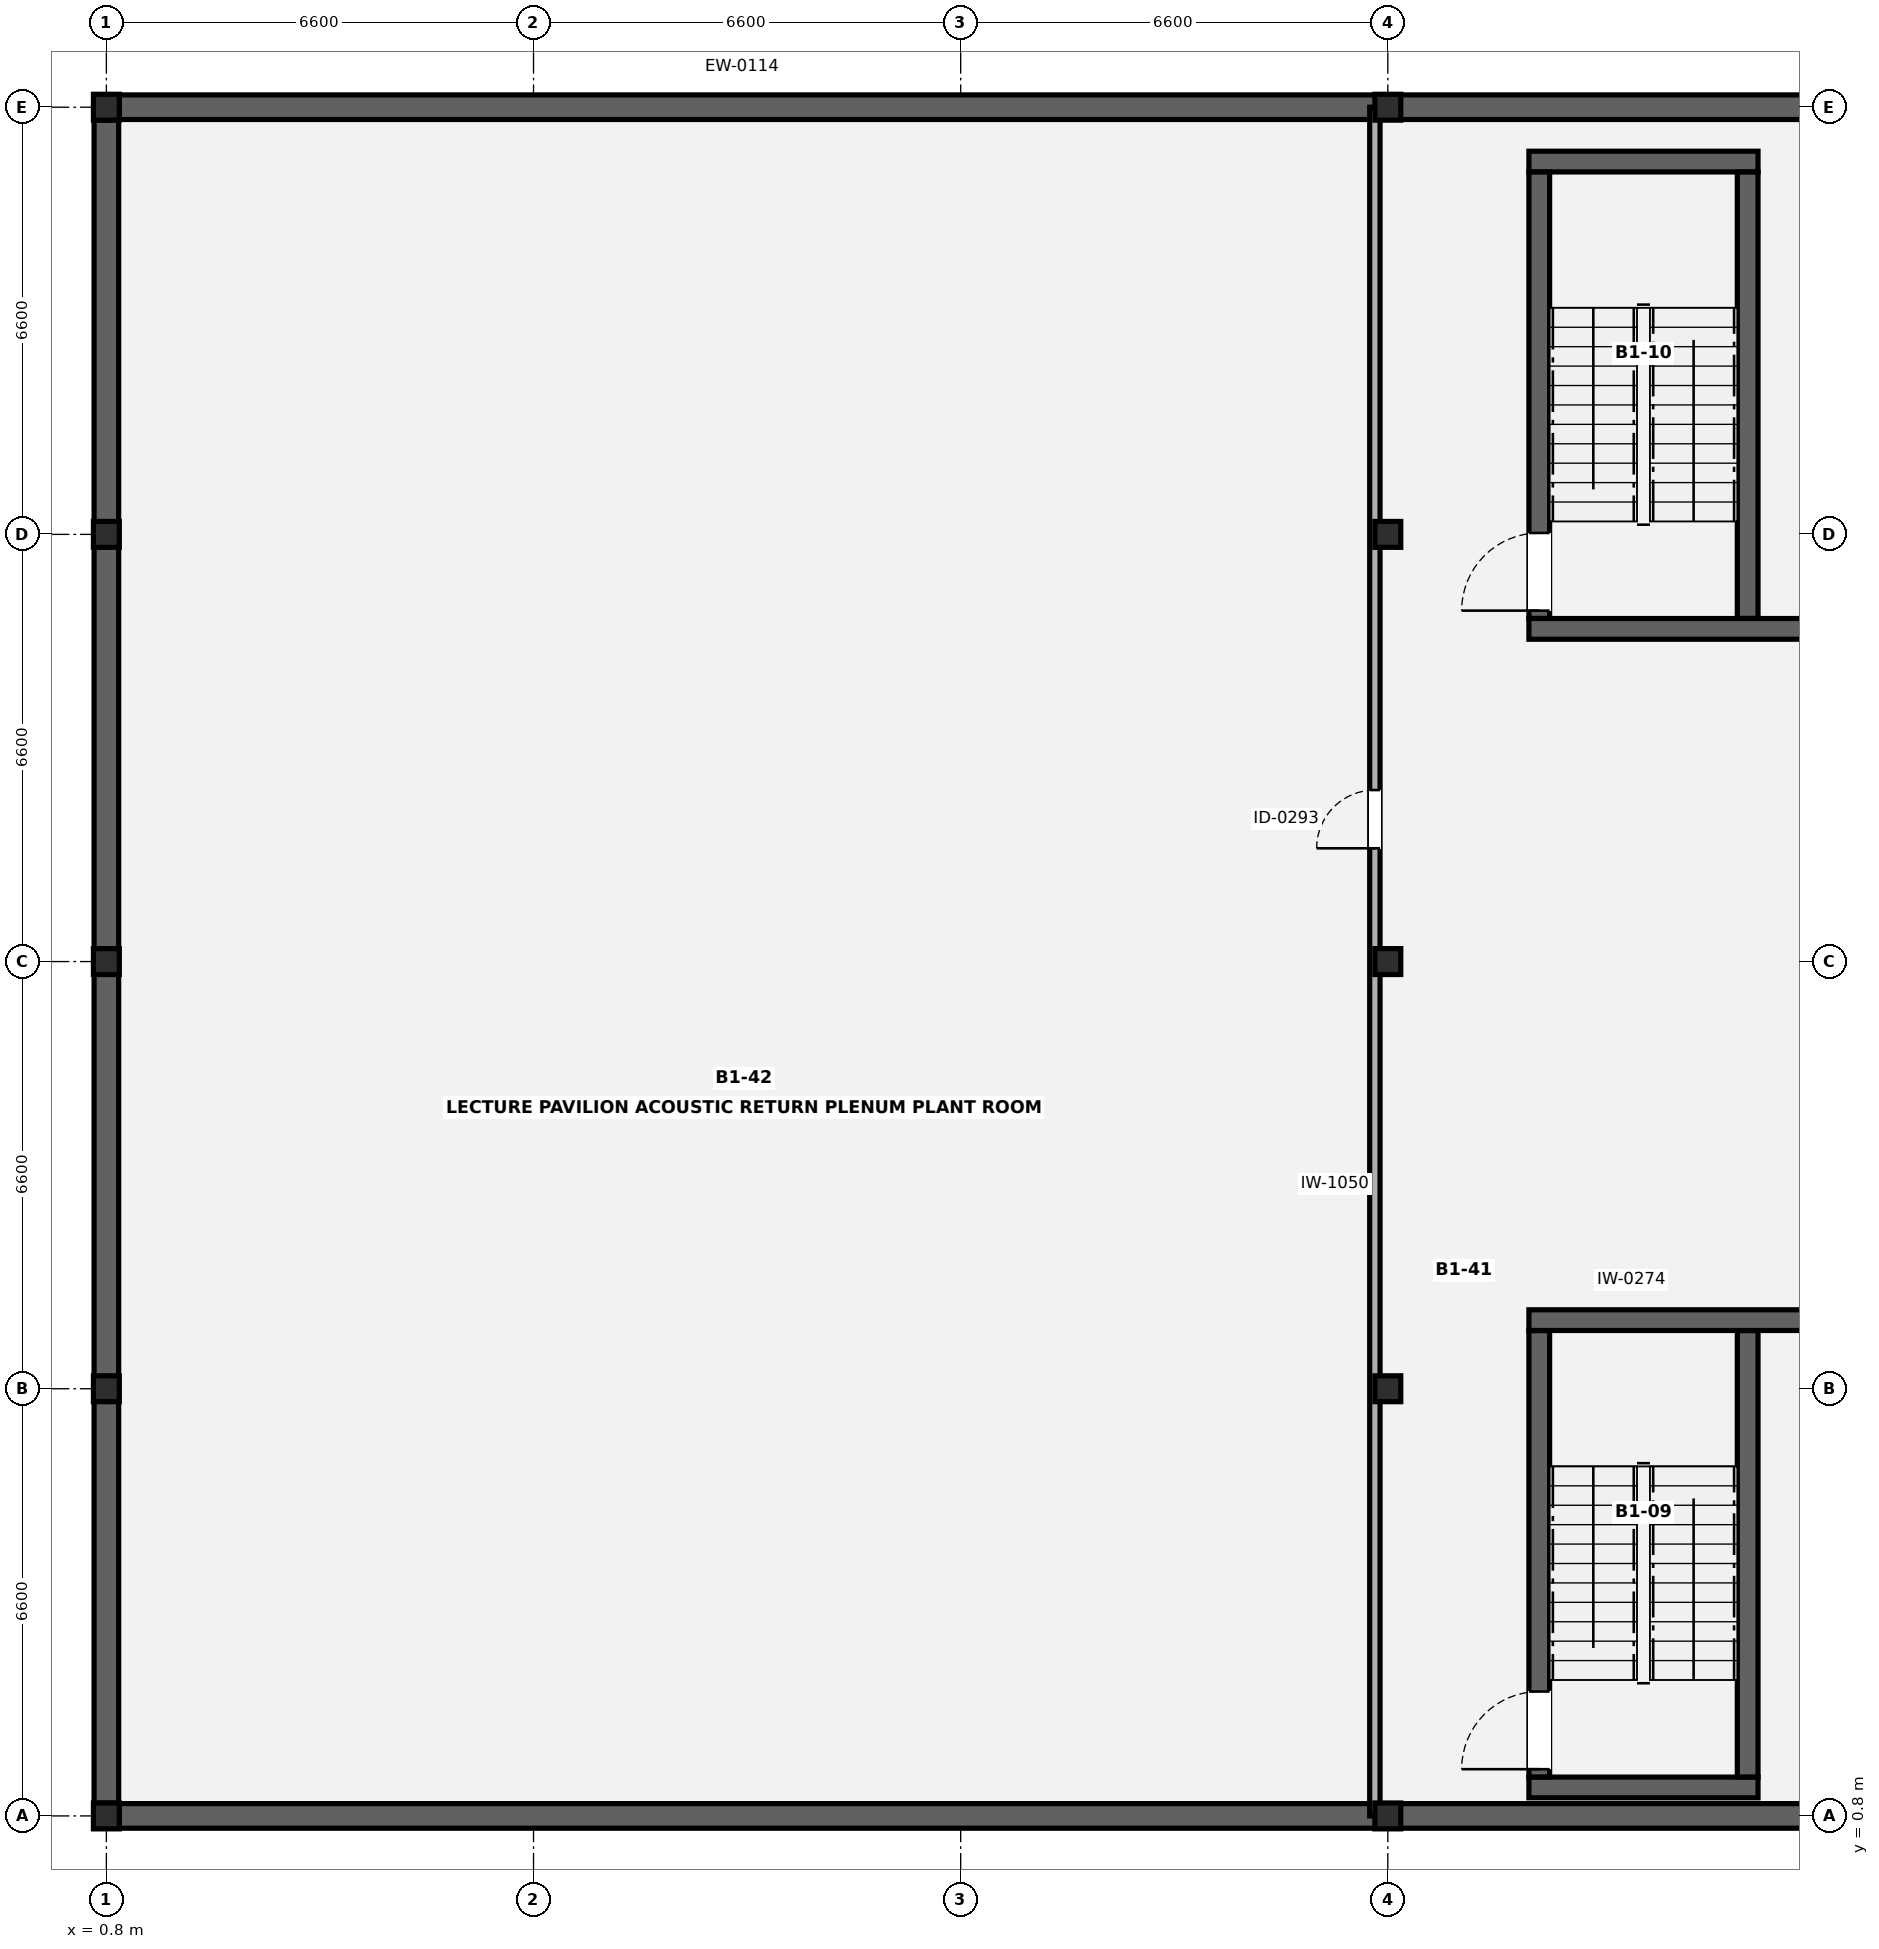
"""IFC4 building model, lengths in metres.
Left out: names, types, materials, properties, quantities, classifications, styles, units other than length and angle.
Written with IfcOpenShell. Run it as: python <this file> out.ifc"""

import sys

from ifc_helpers import new_model, si_unit, direction, frame, frame_2d, origin, origin_2d, place, context, subcontext, project, spatial, rectangle, i_section, extrude, element, fill, save


model = new_model("IFC4")
c1 = context("Model", 3, precision=1e-05, world=origin(), true_north=direction((0.0, 1.0)))
c2 = subcontext(c1, "Body", "Model", "MODEL_VIEW")
j1 = project(units=[si_unit("LENGTHUNIT", "METRE"), si_unit("PLANEANGLEUNIT", "RADIAN")], contexts=[c1])
p1 = place(None, origin())
s1 = spatial("IfcSite", under=j1, at=p1, CompositionType="ELEMENT")
p2 = place(p1, origin())
s2 = spatial("IfcBuilding", under=s1, at=p2, CompositionType="ELEMENT")
p3 = place(p2, frame((0.0, 0.0, -4.2)))
s3 = spatial("IfcBuildingStorey", under=s2, at=p3, CompositionType="ELEMENT", Elevation=-4.2)
for number, where, z_axis, x_axis in (
    (1, (0.8, 0.8, 0.0), (0.0, 0.0, 1.0), (1.0, 0.0, 0.0)),
    (2, (0.8, 7.4, 0.0), (0.0, 0.0, 1.0), (1.0, 0.0, 0.0)),
    (3, (0.8, 14.0, 0.0), (0.0, 0.0, 1.0), (1.0, 0.0, 0.0)),
    (4, (0.8, 20.6, 0.0), (0.0, 0.0, 1.0), (1.0, 0.0, 0.0)),
    (5, (0.8, 27.2, 0.0), (0.0, 0.0, 1.0), (1.0, 0.0, 0.0)),
    (6, (20.6, 0.8, 0.0), (0.0, 0.0, 1.0), (1.0, 0.0, 0.0)),
    (7, (20.6, 7.4, 0.0), (0.0, 0.0, 1.0), (1.0, 0.0, 0.0)),
    (8, (20.6, 14.0, 0.0), (0.0, 0.0, 1.0), (1.0, 0.0, 0.0)),
    (9, (20.6, 20.6, 0.0), (0.0, 0.0, 1.0), (1.0, 0.0, 0.0)),
    (10, (20.6, 27.2, 0.0), (0.0, 0.0, 1.0), (1.0, 0.0, 0.0)),
):
    element("IfcColumn", number, at=place(p3, frame(where, z_axis=z_axis, x_axis=x_axis)), inside=s3, PredefinedType="COLUMN", context=c2, shape_type="SweptSolid", body=[
        extrude(i_section(OverallWidth=0.4, OverallDepth=0.4, WebThickness=0.02, FlangeThickness=0.035, FilletRadius=0.016, at=origin_2d()), origin(), (0.0, 0.0, 1.0), 4.2),
    ])
for number, where, z_axis, x_axis in (
    (11, (0.8, 0.998, 0.0), (0.0, 0.0, 1.0), (0.0, 1.0, 0.0)),
    (12, (0.998, 27.2, 0.0), (0.0, 0.0, 1.0), (1.0, 0.0, 0.0)),
    (13, (27.002, 0.8, 0.0), (0.0, 0.0, 1.0), (-1.0, 0.0, 0.0)),
):
    element("IfcWall", number, at=place(p3, frame(where, z_axis=z_axis, x_axis=x_axis)), inside=s3, PredefinedType="USERDEFINED", context=c2, shape_type="SweptSolid", body=[
        extrude(rectangle(XDim=26.004, YDim=0.38, at=frame_2d((13.002, 0.0))), origin(), (0.0, 0.0, 1.0), 3.9),
    ])
p4 = place(p3, frame((22.78, 1.24, 0.0), z_axis=(0.0, 0.0, 1.0), x_axis=(1.0, 0.0, 0.0)))
e14 = element("IfcWall", 14, at=p4, inside=s3, PredefinedType="SHEAR", context=c2, shape_type="SweptSolid", body=[
    extrude(rectangle(XDim=3.54, YDim=0.32, at=frame_2d((1.77, 0.0))), origin(), (0.0, 0.0, 1.0), 3.94),
])
p5 = place(p3, frame((22.78, 8.46, 0.0), z_axis=(0.0, 0.0, 1.0), x_axis=(1.0, 0.0, 0.0)))
e15 = element("IfcWall", 15, at=p5, inside=s3, PredefinedType="SHEAR", context=c2, shape_type="SweptSolid", body=[
    extrude(rectangle(XDim=4.275, YDim=0.32, at=frame_2d((2.137, 0.0))), origin(), (0.0, 0.0, 1.0), 3.94),
])
p6 = place(p3, frame((22.94, 1.402, 0.0), z_axis=(0.0, 0.0, 1.0), x_axis=(0.0, 1.0, 0.0)))
e16 = element("IfcWall", 16, at=p6, inside=s3, PredefinedType="SHEAR", context=c2, shape_type="SweptSolid", body=[
    extrude(rectangle(XDim=6.896, YDim=0.32, at=frame_2d((3.448, 0.0))), origin(), (0.0, 0.0, 1.0), 3.94),
])
p7 = place(p6, frame((0.12, 0.0, 0.0)))
e17 = element("IfcOpeningElement", 17, at=p7, cuts=e16, PredefinedType="OPENING", context=c2, shape_type="SweptSolid", body=[
    extrude(rectangle(XDim=1.2, YDim=2.15, at=frame_2d((0.6, 1.075))), frame((0.0, 0.17, 0.0), z_axis=(0.0, -1.0, 0.0), x_axis=(1.0, 0.0, 0.0)), (0.0, 0.0, 1.0), 0.34),
])
p8 = place(p3, frame((26.16, 1.402, 0.0), z_axis=(0.0, 0.0, 1.0), x_axis=(0.0, 1.0, 0.0)))
e18 = element("IfcWall", 18, at=p8, inside=s3, PredefinedType="SHEAR", context=c2, shape_type="SweptSolid", body=[
    extrude(rectangle(XDim=6.896, YDim=0.32, at=frame_2d((3.448, 0.0))), origin(), (0.0, 0.0, 1.0), 3.94),
])
p9 = place(p3, frame((22.78, 19.14, 0.0), z_axis=(0.0, 0.0, 1.0), x_axis=(1.0, 0.0, 0.0)))
e19 = element("IfcWall", 19, at=p9, inside=s3, PredefinedType="SHEAR", context=c2, shape_type="SweptSolid", body=[
    extrude(rectangle(XDim=4.275, YDim=0.32, at=frame_2d((2.137, 0.0))), origin(), (0.0, 0.0, 1.0), 3.94),
])
p10 = place(p3, frame((22.78, 26.36, 0.0), z_axis=(0.0, 0.0, 1.0), x_axis=(1.0, 0.0, 0.0)))
e20 = element("IfcWall", 20, at=p10, inside=s3, PredefinedType="SHEAR", context=c2, shape_type="SweptSolid", body=[
    extrude(rectangle(XDim=3.54, YDim=0.32, at=frame_2d((1.77, 0.0))), origin(), (0.0, 0.0, 1.0), 3.94),
])
p11 = place(p3, frame((22.94, 19.302, 0.0), z_axis=(0.0, 0.0, 1.0), x_axis=(0.0, 1.0, 0.0)))
e21 = element("IfcWall", 21, at=p11, inside=s3, PredefinedType="SHEAR", context=c2, shape_type="SweptSolid", body=[
    extrude(rectangle(XDim=6.896, YDim=0.32, at=frame_2d((3.448, 0.0))), origin(), (0.0, 0.0, 1.0), 3.94),
])
p12 = place(p11, frame((0.12, 0.0, 0.0)))
e22 = element("IfcOpeningElement", 22, at=p12, cuts=e21, PredefinedType="OPENING", context=c2, shape_type="SweptSolid", body=[
    extrude(rectangle(XDim=1.2, YDim=2.15, at=frame_2d((0.6, 1.075))), frame((0.0, 0.17, 0.0), z_axis=(0.0, -1.0, 0.0), x_axis=(1.0, 0.0, 0.0)), (0.0, 0.0, 1.0), 0.34),
])
p13 = place(p3, frame((26.16, 19.302, 0.0), z_axis=(0.0, 0.0, 1.0), x_axis=(0.0, 1.0, 0.0)))
e23 = element("IfcWall", 23, at=p13, inside=s3, PredefinedType="SHEAR", context=c2, shape_type="SweptSolid", body=[
    extrude(rectangle(XDim=6.896, YDim=0.32, at=frame_2d((3.448, 0.0))), origin(), (0.0, 0.0, 1.0), 3.94),
])
p14 = place(p3, frame((20.4, 0.8, 0.0), z_axis=(0.0, 0.0, 1.0), x_axis=(0.0, 1.0, 0.0)))
e24 = element("IfcWall", 24, at=p14, inside=s3, PredefinedType="PARTITIONING", context=c2, shape_type="SweptSolid", body=[
    extrude(rectangle(XDim=26.4, YDim=0.16, at=frame_2d((13.2, 0.0))), origin(), (0.0, 0.0, 1.0), 3.445),
])
p15 = place(p14, frame((14.95, 0.0, 0.0)))
e25 = element("IfcOpeningElement", 25, at=p15, cuts=e24, PredefinedType="OPENING", context=c2, shape_type="SweptSolid", body=[
    extrude(rectangle(XDim=0.9, YDim=2.1, at=frame_2d((0.45, 1.05))), frame((0.0, 0.09, 0.0), z_axis=(0.0, -1.0, 0.0), x_axis=(1.0, 0.0, 0.0)), (0.0, 0.0, 1.0), 0.18),
])
p16 = place(p7, origin())
e26 = element("IfcDoor", 26, at=p16, inside=s3, OperationType="SINGLE_SWING_LEFT", PredefinedType="DOOR", context=c2, shape_type="SweptSolid", body=[
    extrude(rectangle(XDim=1.2, YDim=2.15, at=frame_2d((0.6, 1.075))), frame((0.0, 0.025, 0.0), z_axis=(0.0, -1.0, 0.0), x_axis=(1.0, 0.0, 0.0)), (0.0, 0.0, 1.0), 0.05),
])
fill(e17, e26)
p17 = place(p12, origin())
e27 = element("IfcDoor", 27, at=p17, inside=s3, OperationType="SINGLE_SWING_LEFT", PredefinedType="DOOR", context=c2, shape_type="SweptSolid", body=[
    extrude(rectangle(XDim=1.2, YDim=2.15, at=frame_2d((0.6, 1.075))), frame((0.0, 0.025, 0.0), z_axis=(0.0, -1.0, 0.0), x_axis=(1.0, 0.0, 0.0)), (0.0, 0.0, 1.0), 0.05),
])
fill(e22, e27)
p18 = place(p15, origin())
e28 = element("IfcDoor", 28, at=p18, inside=s3, OperationType="SINGLE_SWING_LEFT", PredefinedType="DOOR", context=c2, shape_type="SweptSolid", body=[
    extrude(rectangle(XDim=0.9, YDim=2.1, at=frame_2d((0.45, 1.05))), frame((0.0, 0.025, 0.0), z_axis=(0.0, -1.0, 0.0), x_axis=(1.0, 0.0, 0.0)), (0.0, 0.0, 1.0), 0.05),
])
fill(e25, e28)
save(model, sys.argv[1])
